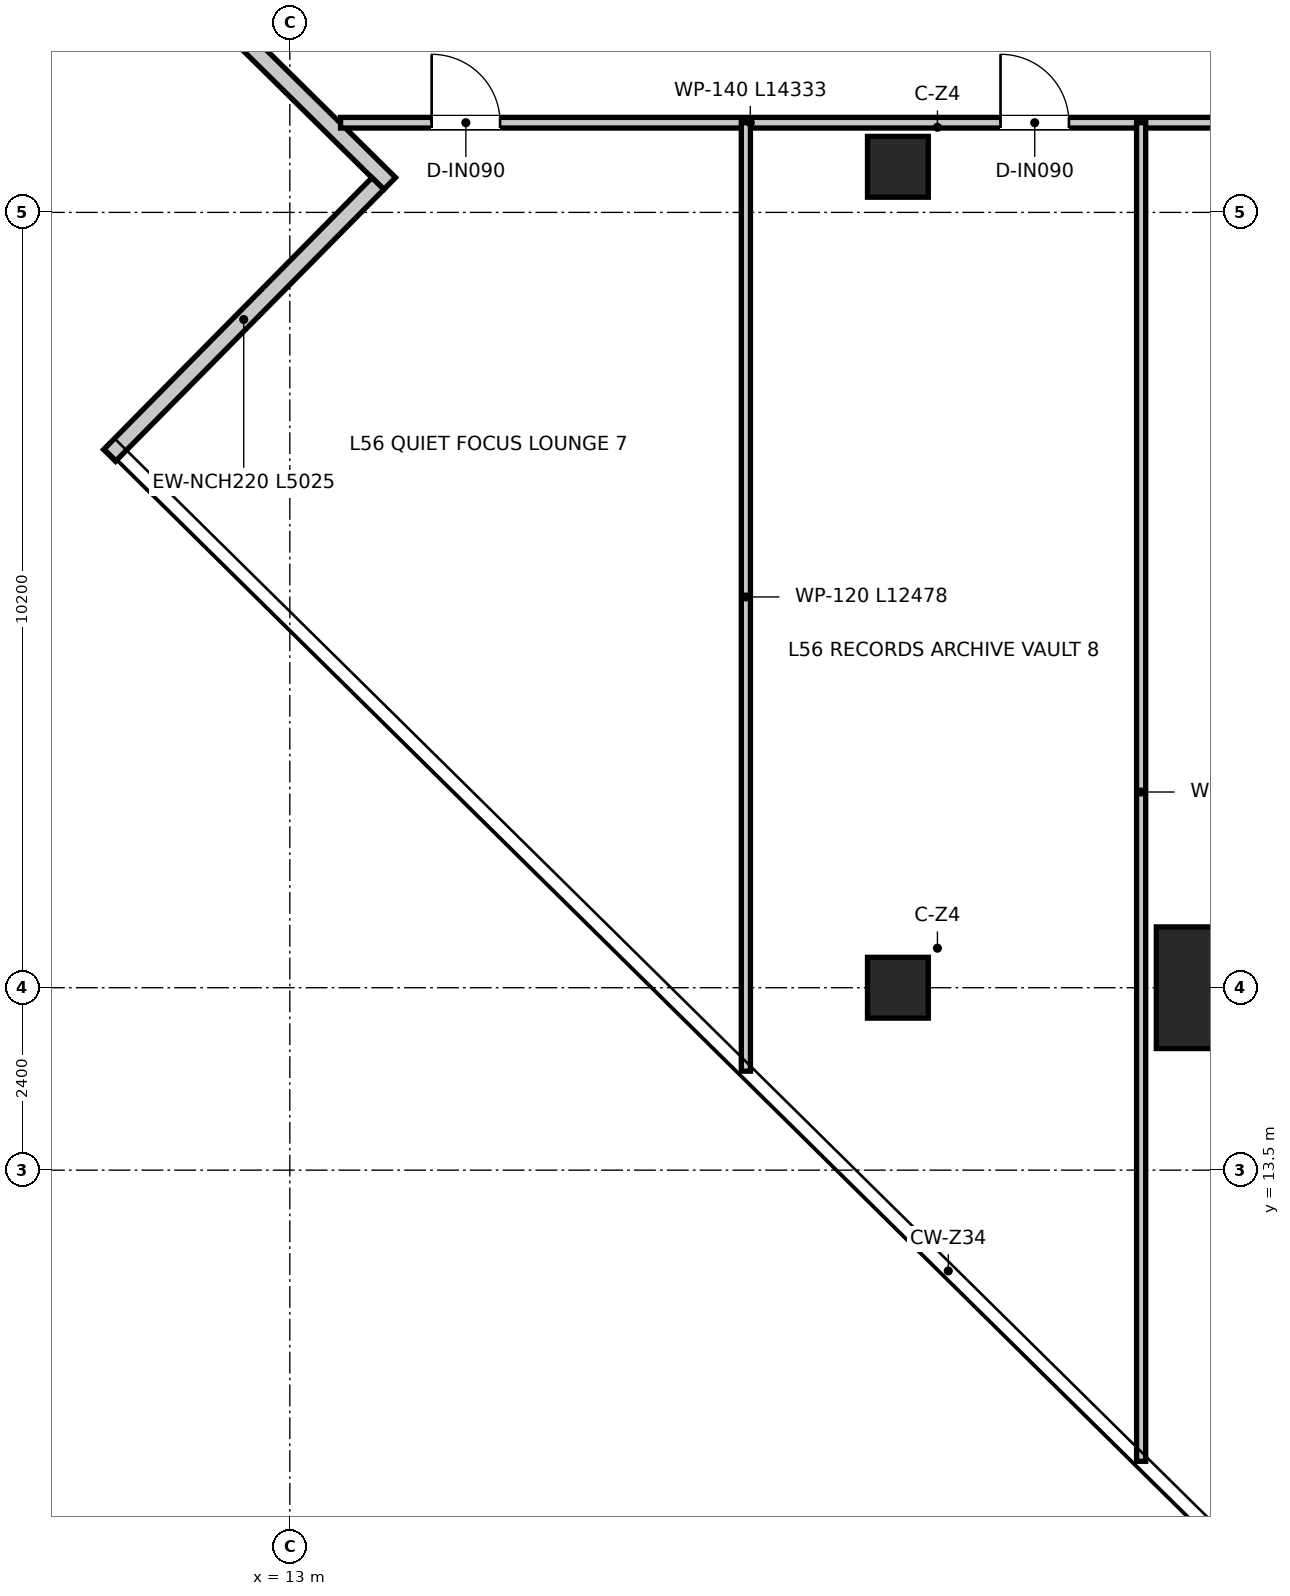
"""IFC4 building model, lengths in metres.
Left out: names, types, materials, properties, quantities, classifications, styles, units other than length and angle.
Written with IfcOpenShell. Run it as: python <this file> out.ifc"""

import sys

from ifc_helpers import new_model, si_unit, direction, frame, frame_2d, origin, origin_2d, place, context, subcontext, project, spatial, rectangle, extrude, source, transform, mapped, element, fill, save


model = new_model("IFC4")
c1 = context("Model", 3, precision=1e-05, world=origin(), true_north=direction((0.0, 1.0)))
c2 = subcontext(c1, "Body", "Model", "MODEL_VIEW")
j1 = project(units=[si_unit("LENGTHUNIT", "METRE"), si_unit("PLANEANGLEUNIT", "RADIAN")], contexts=[c1])
p1 = place(None, origin())
s1 = spatial("IfcSite", under=j1, at=p1, CompositionType="ELEMENT")
p2 = place(p1, origin())
s2 = spatial("IfcBuilding", under=s1, at=p2, CompositionType="ELEMENT")
p3 = place(p2, frame((0.0, 0.0, 231.0)))
s3 = spatial("IfcBuildingStorey", under=s2, at=p3, CompositionType="ELEMENT", Elevation=231.0)
m1 = source(origin(), c2, "Body", "SweptSolid", [
    extrude(rectangle(XDim=1.6, YDim=1.6, at=origin_2d()), origin(), (0.0, 0.0, 1.0), 3.95),
])
p4 = place(p3, frame((25.2, 15.9, 0.0), z_axis=(0.0, 0.0, 1.0), x_axis=(1.0, 0.0, 0.0)))
e1 = element("IfcColumn", 1, at=p4, inside=s3, PredefinedType="USERDEFINED", context=c2, shape_type="MappedRepresentation", body=[
    mapped(m1, transform((0.0, 0.0, 0.0), x_axis=(1.0, 0.0, 0.0), y_axis=(0.0, 1.0, 0.0), z_axis=(0.0, 0.0, 1.0), scale=1.0)),
])
m2 = source(origin(), c2, "Body", "SweptSolid", [
    extrude(rectangle(XDim=0.8, YDim=0.8, at=origin_2d()), origin(), (0.0, 0.0, 1.0), 3.95),
])
for number, where, z_axis, x_axis in (
    (2, (21.0, 15.9, 0.0), (0.0, 0.0, 1.0), (1.0, 0.0, 0.0)),
    (3, (21.0, 26.7, 0.0), (0.0, 0.0, 1.0), (1.0, 0.0, 0.0)),
):
    element("IfcColumn", number, at=place(p3, frame(where, z_axis=z_axis, x_axis=x_axis)), inside=s3, PredefinedType="COLUMN", context=c2, shape_type="MappedRepresentation", body=[
        mapped(m2, transform((0.0, 0.0, 0.0), x_axis=(1.0, 0.0, 0.0), y_axis=(0.0, 1.0, 0.0), z_axis=(0.0, 0.0, 1.0), scale=1.0)),
    ])
p5 = place(p3, frame((10.581, 30.165, 0.0), z_axis=(0.0, 0.0, 1.0), x_axis=(0.711699894533, -0.702483636906, 0.0)))
e4 = element("IfcWall", 4, at=p5, inside=s3, PredefinedType="ELEMENTEDWALL", context=c2, shape_type="SweptSolid", body=[
    extrude(rectangle(XDim=5.245, YDim=0.22, at=frame_2d((2.623, 0.0))), origin(), (0.0, 0.0, 1.0), 3.67),
])
p6 = place(p3, frame((14.158, 26.479, 0.0), z_axis=(0.0, 0.0, 1.0), x_axis=(-0.702451626199, -0.711731489292, 0.0)))
e5 = element("IfcWall", 5, at=p6, inside=s3, PredefinedType="ELEMENTEDWALL", context=c2, shape_type="SweptSolid", body=[
    extrude(rectangle(XDim=5.025, YDim=0.22, at=frame_2d((2.512, 0.0))), origin(), (0.0, 0.0, 1.0), 3.67),
])
p7 = place(p3, frame((13.667, 27.28, 0.0), z_axis=(0.0, 0.0, 1.0), x_axis=(1.0, 0.0, 0.0)))
e6 = element("IfcWall", 6, at=p7, inside=s3, PredefinedType="PARTITIONING", context=c2, shape_type="SweptSolid", body=[
    extrude(rectangle(XDim=14.333, YDim=0.14, at=frame_2d((7.166, 0.0))), origin(), (0.0, 0.0, 1.0), 3.03),
])
p8 = place(p7, frame((1.198, 0.0, 0.0)))
e7 = element("IfcOpeningElement", 7, at=p8, cuts=e6, PredefinedType="OPENING", context=c2, shape_type="SweptSolid", body=[
    extrude(rectangle(XDim=0.9, YDim=2.1, at=frame_2d((0.45, 1.05))), frame((0.0, 0.08, 0.0), z_axis=(0.0, -1.0, 0.0), x_axis=(1.0, 0.0, 0.0)), (0.0, 0.0, 1.0), 0.16),
])
p9 = place(p7, frame((8.683, 0.0, 0.0)))
e8 = element("IfcOpeningElement", 8, at=p9, cuts=e6, PredefinedType="OPENING", context=c2, shape_type="SweptSolid", body=[
    extrude(rectangle(XDim=0.9, YDim=2.1, at=frame_2d((0.45, 1.05))), frame((0.0, 0.08, 0.0), z_axis=(0.0, -1.0, 0.0), x_axis=(1.0, 0.0, 0.0)), (0.0, 0.0, 1.0), 0.16),
])
p10 = place(p7, frame((11.683, 0.0, 0.0)))
e9 = element("IfcOpeningElement", 9, at=p10, cuts=e6, PredefinedType="OPENING", context=c2, shape_type="SweptSolid", body=[
    extrude(rectangle(XDim=0.9, YDim=2.1, at=frame_2d((0.45, 1.05))), frame((0.0, 0.08, 0.0), z_axis=(0.0, -1.0, 0.0), x_axis=(1.0, 0.0, 0.0)), (0.0, 0.0, 1.0), 0.16),
])
p11 = place(p3, frame((19.0, 14.802, 0.0), z_axis=(0.0, 0.0, 1.0), x_axis=(0.0, 1.0, 0.0)))
e10 = element("IfcWall", 10, at=p11, inside=s3, PredefinedType="PARTITIONING", context=c2, shape_type="SweptSolid", body=[
    extrude(rectangle(XDim=12.478, YDim=0.12, at=frame_2d((6.239, 0.0))), origin(), (0.0, 0.0, 1.0), 3.67),
])
p12 = place(p3, frame((24.2, 9.669, 0.0), z_axis=(0.0, 0.0, 1.0), x_axis=(0.0, 1.0, 0.0)))
e11 = element("IfcWall", 11, at=p12, inside=s3, PredefinedType="PARTITIONING", context=c2, shape_type="SweptSolid", body=[
    extrude(rectangle(XDim=17.611, YDim=0.12, at=frame_2d((8.805, 0.0))), origin(), (0.0, 0.0, 1.0), 3.18),
])
p13 = place(p8, origin())
e12 = element("IfcDoor", 12, at=p13, inside=s3, OperationType="SINGLE_SWING_LEFT", PredefinedType="DOOR", context=c2, shape_type="SweptSolid", body=[
    extrude(rectangle(XDim=0.9, YDim=2.1, at=frame_2d((0.45, 1.05))), frame((0.0, 0.025, 0.0), z_axis=(0.0, -1.0, 0.0), x_axis=(1.0, 0.0, 0.0)), (0.0, 0.0, 1.0), 0.05),
])
fill(e7, e12)
p14 = place(p9, origin())
e13 = element("IfcDoor", 13, at=p14, inside=s3, OperationType="SINGLE_SWING_LEFT", PredefinedType="DOOR", context=c2, shape_type="SweptSolid", body=[
    extrude(rectangle(XDim=0.9, YDim=2.1, at=frame_2d((0.45, 1.05))), frame((0.0, 0.025, 0.0), z_axis=(0.0, -1.0, 0.0), x_axis=(1.0, 0.0, 0.0)), (0.0, 0.0, 1.0), 0.05),
])
fill(e8, e13)
save(model, sys.argv[1])
